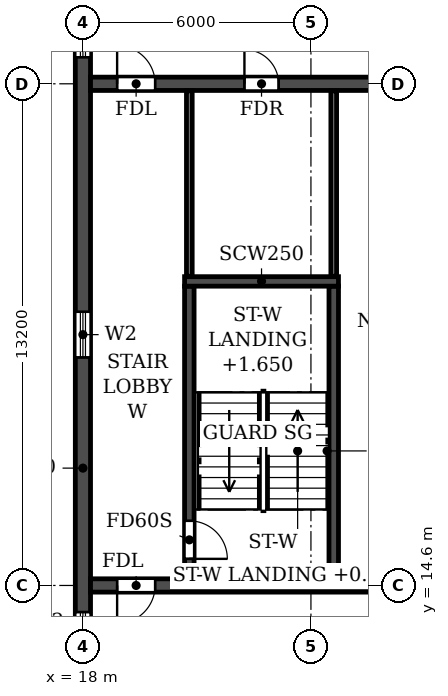
"""IFC4 building model, lengths in metres.
Left out: names, types, materials, properties, quantities, classifications, styles, units other than length and angle.
Written with IfcOpenShell. Run it as: python <this file> out.ifc"""

import sys

from ifc_helpers import new_model, si_unit, direction, frame, frame_2d, origin, place, context, subcontext, project, spatial, rectangle, extrude, element, fill, save


model = new_model("IFC4")
c1 = context("Model", 3, precision=1e-05, world=origin(), true_north=direction((0.0, 1.0)))
c2 = subcontext(c1, "Body", "Model", "MODEL_VIEW")
j1 = project(units=[si_unit("LENGTHUNIT", "METRE"), si_unit("PLANEANGLEUNIT", "RADIAN")], contexts=[c1])
p1 = place(None, origin())
s1 = spatial("IfcSite", under=j1, at=p1, CompositionType="ELEMENT")
p2 = place(p1, origin())
s2 = spatial("IfcBuilding", under=s1, at=p2, CompositionType="ELEMENT")
p3 = place(p2, frame((0.0, 0.0, 257.7)))
s3 = spatial("IfcBuildingStorey", under=s2, at=p3, CompositionType="ELEMENT", Elevation=257.7)
p4 = place(p3, frame((18.0, 4.683, 0.0), z_axis=(0.0, 0.0, 1.0), x_axis=(0.0, 1.0, 0.0)))
e1 = element("IfcWall", 1, at=p4, inside=s3, PredefinedType="SHEAR", context=c2, shape_type="SweptSolid", body=[
    extrude(rectangle(XDim=31.834, YDim=0.4, at=frame_2d((15.917, 0.0))), origin(), (0.0, 0.0, 1.0), 3.0),
])
p5 = place(p4, frame((23.817, 0.0, 0.9)))
e2 = element("IfcOpeningElement", 2, at=p5, cuts=e1, PredefinedType="OPENING", context=c2, shape_type="SweptSolid", body=[
    extrude(rectangle(XDim=1.2, YDim=1.5, at=frame_2d((0.6, 0.75))), frame((0.0, 0.21, 0.0), z_axis=(0.0, -1.0, 0.0), x_axis=(1.0, 0.0, 0.0)), (0.0, 0.0, 1.0), 0.42),
])
p6 = place(p4, frame((8.017, 0.0, 0.9)))
e3 = element("IfcOpeningElement", 3, at=p6, cuts=e1, PredefinedType="OPENING", context=c2, shape_type="SweptSolid", body=[
    extrude(rectangle(XDim=1.2, YDim=1.5, at=frame_2d((0.6, 0.75))), frame((0.0, 0.21, 0.0), z_axis=(0.0, -1.0, 0.0), x_axis=(1.0, 0.0, 0.0)), (0.0, 0.0, 1.0), 0.42),
])
p7 = place(p4, frame((27.694, 0.0, 0.6)))
e4 = element("IfcOpeningElement", 4, at=p7, cuts=e1, PredefinedType="OPENING", context=c2, shape_type="SweptSolid", body=[
    extrude(rectangle(XDim=2.2, YDim=1.8, at=frame_2d((1.1, 0.9))), frame((0.0, 0.21, 0.0), z_axis=(0.0, -1.0, 0.0), x_axis=(1.0, 0.0, 0.0)), (0.0, 0.0, 1.0), 0.42),
])
p8 = place(p4, frame((2.541, 0.0, 0.6)))
e5 = element("IfcOpeningElement", 5, at=p8, cuts=e1, PredefinedType="OPENING", context=c2, shape_type="SweptSolid", body=[
    extrude(rectangle(XDim=2.2, YDim=1.8, at=frame_2d((1.1, 0.9))), frame((0.0, 0.21, 0.0), z_axis=(0.0, -1.0, 0.0), x_axis=(1.0, 0.0, 0.0)), (0.0, 0.0, 1.0), 0.42),
])
p9 = place(p4, frame((15.917, 0.0, 0.9)))
e6 = element("IfcOpeningElement", 6, at=p9, cuts=e1, PredefinedType="OPENING", context=c2, shape_type="SweptSolid", body=[
    extrude(rectangle(XDim=1.2, YDim=1.5, at=frame_2d((0.6, 0.75))), frame((0.0, 0.21, 0.0), z_axis=(0.0, -1.0, 0.0), x_axis=(1.0, 0.0, 0.0)), (0.0, 0.0, 1.0), 0.42),
])
p10 = place(p3, frame((18.2, 14.6, 0.0), z_axis=(0.0, 0.0, 1.0), x_axis=(1.0, 0.0, 0.0)))
e7 = element("IfcWall", 7, at=p10, inside=s3, PredefinedType="SOLIDWALL", context=c2, shape_type="SweptSolid", body=[
    extrude(rectangle(XDim=65.6, YDim=0.35, at=frame_2d((32.8, 0.0))), origin(), (0.0, 0.0, 1.0), 3.0),
])
p11 = place(p10, frame((0.7, 0.0, 0.0)))
e8 = element("IfcOpeningElement", 8, at=p11, cuts=e7, PredefinedType="OPENING", context=c2, shape_type="SweptSolid", body=[
    extrude(rectangle(XDim=1.0, YDim=2.1, at=frame_2d((0.5, 1.05))), frame((0.0, 0.185, 0.0), z_axis=(0.0, -1.0, 0.0), x_axis=(1.0, 0.0, 0.0)), (0.0, 0.0, 1.0), 0.37),
])
p12 = place(p10, frame((8.6, 0.0, 0.0)))
e9 = element("IfcOpeningElement", 9, at=p12, cuts=e7, PredefinedType="OPENING", context=c2, shape_type="SweptSolid", body=[
    extrude(rectangle(XDim=1.0, YDim=2.1, at=frame_2d((0.5, 1.05))), frame((0.0, 0.185, 0.0), z_axis=(0.0, -1.0, 0.0), x_axis=(1.0, 0.0, 0.0)), (0.0, 0.0, 1.0), 0.37),
])
p13 = place(p10, frame((13.2, 0.0, 0.0)))
e10 = element("IfcOpeningElement", 10, at=p13, cuts=e7, PredefinedType="OPENING", context=c2, shape_type="SweptSolid", body=[
    extrude(rectangle(XDim=1.0, YDim=2.1, at=frame_2d((0.5, 1.05))), frame((0.0, 0.185, 0.0), z_axis=(0.0, -1.0, 0.0), x_axis=(1.0, 0.0, 0.0)), (0.0, 0.0, 1.0), 0.37),
])
p14 = place(p10, frame((24.5, 0.0, 0.0)))
e11 = element("IfcOpeningElement", 11, at=p14, cuts=e7, PredefinedType="OPENING", context=c2, shape_type="SweptSolid", body=[
    extrude(rectangle(XDim=1.0, YDim=2.1, at=frame_2d((0.5, 1.05))), frame((0.0, 0.185, 0.0), z_axis=(0.0, -1.0, 0.0), x_axis=(1.0, 0.0, 0.0)), (0.0, 0.0, 1.0), 0.37),
])
p15 = place(p10, frame((28.4, 0.0, 0.0)))
e12 = element("IfcOpeningElement", 12, at=p15, cuts=e7, PredefinedType="OPENING", context=c2, shape_type="SweptSolid", body=[
    extrude(rectangle(XDim=1.0, YDim=2.1, at=frame_2d((0.5, 1.05))), frame((0.0, 0.185, 0.0), z_axis=(0.0, -1.0, 0.0), x_axis=(1.0, 0.0, 0.0)), (0.0, 0.0, 1.0), 0.37),
])
p16 = place(p10, frame((32.3, 0.0, 0.0)))
e13 = element("IfcOpeningElement", 13, at=p16, cuts=e7, PredefinedType="OPENING", context=c2, shape_type="SweptSolid", body=[
    extrude(rectangle(XDim=1.0, YDim=2.1, at=frame_2d((0.5, 1.05))), frame((0.0, 0.185, 0.0), z_axis=(0.0, -1.0, 0.0), x_axis=(1.0, 0.0, 0.0)), (0.0, 0.0, 1.0), 0.37),
])
p17 = place(p10, frame((34.9, 0.0, 0.0)))
e14 = element("IfcOpeningElement", 14, at=p17, cuts=e7, PredefinedType="OPENING", context=c2, shape_type="SweptSolid", body=[
    extrude(rectangle(XDim=1.0, YDim=2.1, at=frame_2d((0.5, 1.05))), frame((0.0, 0.185, 0.0), z_axis=(0.0, -1.0, 0.0), x_axis=(1.0, 0.0, 0.0)), (0.0, 0.0, 1.0), 0.37),
])
p18 = place(p10, frame((38.8, 0.0, 0.0)))
e15 = element("IfcOpeningElement", 15, at=p18, cuts=e7, PredefinedType="OPENING", context=c2, shape_type="SweptSolid", body=[
    extrude(rectangle(XDim=1.0, YDim=2.1, at=frame_2d((0.5, 1.05))), frame((0.0, 0.185, 0.0), z_axis=(0.0, -1.0, 0.0), x_axis=(1.0, 0.0, 0.0)), (0.0, 0.0, 1.0), 0.37),
])
p19 = place(p10, frame((51.4, 0.0, 0.0)))
e16 = element("IfcOpeningElement", 16, at=p19, cuts=e7, PredefinedType="OPENING", context=c2, shape_type="SweptSolid", body=[
    extrude(rectangle(XDim=1.0, YDim=2.1, at=frame_2d((0.5, 1.05))), frame((0.0, 0.185, 0.0), z_axis=(0.0, -1.0, 0.0), x_axis=(1.0, 0.0, 0.0)), (0.0, 0.0, 1.0), 0.37),
])
p20 = place(p10, frame((56.0, 0.0, 0.0)))
e17 = element("IfcOpeningElement", 17, at=p20, cuts=e7, PredefinedType="OPENING", context=c2, shape_type="SweptSolid", body=[
    extrude(rectangle(XDim=1.0, YDim=2.1, at=frame_2d((0.5, 1.05))), frame((0.0, 0.185, 0.0), z_axis=(0.0, -1.0, 0.0), x_axis=(1.0, 0.0, 0.0)), (0.0, 0.0, 1.0), 0.37),
])
p21 = place(p10, frame((63.9, 0.0, 0.0)))
e18 = element("IfcOpeningElement", 18, at=p21, cuts=e7, PredefinedType="OPENING", context=c2, shape_type="SweptSolid", body=[
    extrude(rectangle(XDim=1.0, YDim=2.1, at=frame_2d((0.5, 1.05))), frame((0.0, 0.185, 0.0), z_axis=(0.0, -1.0, 0.0), x_axis=(1.0, 0.0, 0.0)), (0.0, 0.0, 1.0), 0.37),
])
p22 = place(p3, frame((18.2, 27.8, 0.0), z_axis=(0.0, 0.0, 1.0), x_axis=(1.0, 0.0, 0.0)))
e19 = element("IfcWall", 19, at=p22, inside=s3, PredefinedType="SOLIDWALL", context=c2, shape_type="SweptSolid", body=[
    extrude(rectangle(XDim=65.6, YDim=0.35, at=frame_2d((32.8, 0.0))), origin(), (0.0, 0.0, 1.0), 3.0),
])
p23 = place(p22, frame((0.7, 0.0, 0.0)))
e20 = element("IfcOpeningElement", 20, at=p23, cuts=e19, PredefinedType="OPENING", context=c2, shape_type="SweptSolid", body=[
    extrude(rectangle(XDim=1.0, YDim=2.1, at=frame_2d((0.5, 1.05))), frame((0.0, 0.185, 0.0), z_axis=(0.0, -1.0, 0.0), x_axis=(1.0, 0.0, 0.0)), (0.0, 0.0, 1.0), 0.37),
])
p24 = place(p22, frame((4.05, 0.0, 0.0)))
e21 = element("IfcOpeningElement", 21, at=p24, cuts=e19, PredefinedType="OPENING", context=c2, shape_type="SweptSolid", body=[
    extrude(rectangle(XDim=0.9, YDim=2.1, at=frame_2d((0.45, 1.05))), frame((0.0, 0.185, 0.0), z_axis=(0.0, -1.0, 0.0), x_axis=(1.0, 0.0, 0.0)), (0.0, 0.0, 1.0), 0.37),
])
p25 = place(p22, frame((13.25, 0.0, 0.0)))
e22 = element("IfcOpeningElement", 22, at=p25, cuts=e19, PredefinedType="OPENING", context=c2, shape_type="SweptSolid", body=[
    extrude(rectangle(XDim=0.9, YDim=2.1, at=frame_2d((0.45, 1.05))), frame((0.0, 0.185, 0.0), z_axis=(0.0, -1.0, 0.0), x_axis=(1.0, 0.0, 0.0)), (0.0, 0.0, 1.0), 0.37),
])
p26 = place(p22, frame((19.0, 0.0, 0.0)))
e23 = element("IfcOpeningElement", 23, at=p26, cuts=e19, PredefinedType="OPENING", context=c2, shape_type="SweptSolid", body=[
    extrude(rectangle(XDim=1.0, YDim=2.1, at=frame_2d((0.5, 1.05))), frame((0.0, 0.185, 0.0), z_axis=(0.0, -1.0, 0.0), x_axis=(1.0, 0.0, 0.0)), (0.0, 0.0, 1.0), 0.37),
])
p27 = place(p22, frame((24.2, 0.0, 0.0)))
e24 = element("IfcOpeningElement", 24, at=p27, cuts=e19, PredefinedType="OPENING", context=c2, shape_type="SweptSolid", body=[
    extrude(rectangle(XDim=1.0, YDim=2.1, at=frame_2d((0.5, 1.05))), frame((0.0, 0.185, 0.0), z_axis=(0.0, -1.0, 0.0), x_axis=(1.0, 0.0, 0.0)), (0.0, 0.0, 1.0), 0.37),
])
p28 = place(p22, frame((29.4, 0.0, 0.0)))
e25 = element("IfcOpeningElement", 25, at=p28, cuts=e19, PredefinedType="OPENING", context=c2, shape_type="SweptSolid", body=[
    extrude(rectangle(XDim=1.0, YDim=2.1, at=frame_2d((0.5, 1.05))), frame((0.0, 0.185, 0.0), z_axis=(0.0, -1.0, 0.0), x_axis=(1.0, 0.0, 0.0)), (0.0, 0.0, 1.0), 0.37),
])
p29 = place(p22, frame((32.3, 0.0, 0.0)))
e26 = element("IfcOpeningElement", 26, at=p29, cuts=e19, PredefinedType="OPENING", context=c2, shape_type="SweptSolid", body=[
    extrude(rectangle(XDim=1.0, YDim=2.1, at=frame_2d((0.5, 1.05))), frame((0.0, 0.185, 0.0), z_axis=(0.0, -1.0, 0.0), x_axis=(1.0, 0.0, 0.0)), (0.0, 0.0, 1.0), 0.37),
])
p30 = place(p22, frame((36.5, 0.0, 0.0)))
e27 = element("IfcOpeningElement", 27, at=p30, cuts=e19, PredefinedType="OPENING", context=c2, shape_type="SweptSolid", body=[
    extrude(rectangle(XDim=1.0, YDim=2.1, at=frame_2d((0.5, 1.05))), frame((0.0, 0.185, 0.0), z_axis=(0.0, -1.0, 0.0), x_axis=(1.0, 0.0, 0.0)), (0.0, 0.0, 1.0), 0.37),
])
p31 = place(p22, frame((40.4, 0.0, 0.0)))
e28 = element("IfcOpeningElement", 28, at=p31, cuts=e19, PredefinedType="OPENING", context=c2, shape_type="SweptSolid", body=[
    extrude(rectangle(XDim=1.0, YDim=2.1, at=frame_2d((0.5, 1.05))), frame((0.0, 0.185, 0.0), z_axis=(0.0, -1.0, 0.0), x_axis=(1.0, 0.0, 0.0)), (0.0, 0.0, 1.0), 0.37),
])
p32 = place(p22, frame((43.0, 0.0, 0.0)))
e29 = element("IfcOpeningElement", 29, at=p32, cuts=e19, PredefinedType="OPENING", context=c2, shape_type="SweptSolid", body=[
    extrude(rectangle(XDim=1.0, YDim=2.1, at=frame_2d((0.5, 1.05))), frame((0.0, 0.185, 0.0), z_axis=(0.0, -1.0, 0.0), x_axis=(1.0, 0.0, 0.0)), (0.0, 0.0, 1.0), 0.37),
])
p33 = place(p22, frame((46.65, 0.0, 0.0)))
e30 = element("IfcOpeningElement", 30, at=p33, cuts=e19, PredefinedType="OPENING", context=c2, shape_type="SweptSolid", body=[
    extrude(rectangle(XDim=1.5, YDim=2.1, at=frame_2d((0.75, 1.05))), frame((0.0, 0.185, 0.0), z_axis=(0.0, -1.0, 0.0), x_axis=(1.0, 0.0, 0.0)), (0.0, 0.0, 1.0), 0.37),
])
p34 = place(p22, frame((51.45, 0.0, 0.0)))
e31 = element("IfcOpeningElement", 31, at=p34, cuts=e19, PredefinedType="OPENING", context=c2, shape_type="SweptSolid", body=[
    extrude(rectangle(XDim=0.9, YDim=2.1, at=frame_2d((0.45, 1.05))), frame((0.0, 0.185, 0.0), z_axis=(0.0, -1.0, 0.0), x_axis=(1.0, 0.0, 0.0)), (0.0, 0.0, 1.0), 0.37),
])
p35 = place(p22, frame((60.65, 0.0, 0.0)))
e32 = element("IfcOpeningElement", 32, at=p35, cuts=e19, PredefinedType="OPENING", context=c2, shape_type="SweptSolid", body=[
    extrude(rectangle(XDim=0.9, YDim=2.1, at=frame_2d((0.45, 1.05))), frame((0.0, 0.185, 0.0), z_axis=(0.0, -1.0, 0.0), x_axis=(1.0, 0.0, 0.0)), (0.0, 0.0, 1.0), 0.37),
])
p36 = place(p22, frame((63.9, 0.0, 0.0)))
e33 = element("IfcOpeningElement", 33, at=p36, cuts=e19, PredefinedType="OPENING", context=c2, shape_type="SweptSolid", body=[
    extrude(rectangle(XDim=1.0, YDim=2.1, at=frame_2d((0.5, 1.05))), frame((0.0, 0.185, 0.0), z_axis=(0.0, -1.0, 0.0), x_axis=(1.0, 0.0, 0.0)), (0.0, 0.0, 1.0), 0.37),
])
p37 = place(p3, frame((20.8, 14.775, 0.0), z_axis=(0.0, 0.0, 1.0), x_axis=(0.0, 1.0, 0.0)))
e34 = element("IfcWall", 34, at=p37, inside=s3, PredefinedType="SOLIDWALL", context=c2, shape_type="SweptSolid", body=[
    extrude(rectangle(XDim=7.7, YDim=0.25, at=frame_2d((3.85, 0.0))), origin(), (0.0, 0.0, 1.0), 3.0),
])
p38 = place(p37, frame((0.525, 0.0, 0.0)))
e35 = element("IfcOpeningElement", 35, at=p38, cuts=e34, PredefinedType="OPENING", context=c2, shape_type="SweptSolid", body=[
    extrude(rectangle(XDim=1.0, YDim=2.1, at=frame_2d((0.5, 1.05))), frame((0.0, 0.135, 0.0), z_axis=(0.0, -1.0, 0.0), x_axis=(1.0, 0.0, 0.0)), (0.0, 0.0, 1.0), 0.27),
])
p39 = place(p3, frame((24.6, 14.775, 0.0), z_axis=(0.0, 0.0, 1.0), x_axis=(0.0, 1.0, 0.0)))
e36 = element("IfcWall", 36, at=p39, inside=s3, PredefinedType="SOLIDWALL", context=c2, shape_type="SweptSolid", body=[
    extrude(rectangle(XDim=7.7, YDim=0.25, at=frame_2d((3.85, 0.0))), origin(), (0.0, 0.0, 1.0), 3.0),
])
p40 = place(p3, frame((20.675, 22.6, 0.0), z_axis=(0.0, 0.0, 1.0), x_axis=(1.0, 0.0, 0.0)))
e37 = element("IfcWall", 37, at=p40, inside=s3, PredefinedType="SOLIDWALL", context=c2, shape_type="SweptSolid", body=[
    extrude(rectangle(XDim=4.05, YDim=0.25, at=frame_2d((2.025, 0.0))), origin(), (0.0, 0.0, 1.0), 3.0),
])
for number, where, z_axis, x_axis in (
    (38, (20.8, 22.735, 0.0), (0.0, 0.0, 1.0), (0.0, 1.0, 0.0)),
    (39, (24.6, 22.735, 0.0), (0.0, 0.0, 1.0), (0.0, 1.0, 0.0)),
):
    element("IfcWall", number, at=place(p3, frame(where, z_axis=z_axis, x_axis=x_axis)), inside=s3, PredefinedType="PARTITIONING", context=c2, shape_type="SweptSolid", body=[
        extrude(rectangle(XDim=4.88, YDim=0.15, at=frame_2d((2.44, 0.0))), origin(), (0.0, 0.0, 1.0), 3.0),
    ])
p41 = place(p5, origin())
e40 = element("IfcWindow", 40, at=p41, inside=s3, PartitioningType="SINGLE_PANEL", PredefinedType="WINDOW", context=c2, shape_type="SweptSolid", body=[
    extrude(rectangle(XDim=1.2, YDim=1.5, at=frame_2d((0.6, 0.75))), frame((0.0, 0.03, 0.0), z_axis=(0.0, -1.0, 0.0), x_axis=(1.0, 0.0, 0.0)), (0.0, 0.0, 1.0), 0.06),
])
fill(e2, e40)
p42 = place(p6, origin())
e41 = element("IfcWindow", 41, at=p42, inside=s3, PartitioningType="SINGLE_PANEL", PredefinedType="WINDOW", context=c2, shape_type="SweptSolid", body=[
    extrude(rectangle(XDim=1.2, YDim=1.5, at=frame_2d((0.6, 0.75))), frame((0.0, 0.03, 0.0), z_axis=(0.0, -1.0, 0.0), x_axis=(1.0, 0.0, 0.0)), (0.0, 0.0, 1.0), 0.06),
])
fill(e3, e41)
p43 = place(p9, origin())
e42 = element("IfcWindow", 42, at=p43, inside=s3, PartitioningType="SINGLE_PANEL", PredefinedType="WINDOW", context=c2, shape_type="SweptSolid", body=[
    extrude(rectangle(XDim=1.2, YDim=1.5, at=frame_2d((0.6, 0.75))), frame((0.0, 0.03, 0.0), z_axis=(0.0, -1.0, 0.0), x_axis=(1.0, 0.0, 0.0)), (0.0, 0.0, 1.0), 0.06),
])
fill(e6, e42)
p44 = place(p23, origin())
e43 = element("IfcDoor", 43, at=p44, inside=s3, OperationType="SINGLE_SWING_LEFT", PredefinedType="DOOR", context=c2, shape_type="SweptSolid", body=[
    extrude(rectangle(XDim=1.0, YDim=2.1, at=frame_2d((0.5, 1.05))), frame((0.0, 0.025, 0.0), z_axis=(0.0, -1.0, 0.0), x_axis=(1.0, 0.0, 0.0)), (0.0, 0.0, 1.0), 0.05),
])
fill(e20, e43)
p45 = place(p24, origin())
e44 = element("IfcDoor", 44, at=p45, inside=s3, OperationType="SINGLE_SWING_LEFT", PredefinedType="DOOR", context=c2, shape_type="SweptSolid", body=[
    extrude(rectangle(XDim=0.9, YDim=2.1, at=frame_2d((0.45, 1.05))), frame((0.0, 0.025, 0.0), z_axis=(0.0, -1.0, 0.0), x_axis=(1.0, 0.0, 0.0)), (0.0, 0.0, 1.0), 0.05),
])
fill(e21, e44)
p46 = place(p11, frame((1.0, 0.0, 0.0), z_axis=(0.0, 0.0, 1.0), x_axis=(-1.0, 0.0, 0.0)))
e45 = element("IfcDoor", 45, at=p46, inside=s3, OperationType="SINGLE_SWING_RIGHT", PredefinedType="DOOR", context=c2, shape_type="SweptSolid", body=[
    extrude(rectangle(XDim=1.0, YDim=2.1, at=frame_2d((0.5, 1.05))), frame((0.0, 0.025, 0.0), z_axis=(0.0, -1.0, 0.0), x_axis=(1.0, 0.0, 0.0)), (0.0, 0.0, 1.0), 0.05),
])
fill(e8, e45)
p47 = place(p38, frame((1.0, 0.0, 0.0), z_axis=(0.0, 0.0, 1.0), x_axis=(-1.0, 0.0, 0.0)))
e46 = element("IfcDoor", 46, at=p47, inside=s3, OperationType="SINGLE_SWING_RIGHT", PredefinedType="DOOR", context=c2, shape_type="SweptSolid", body=[
    extrude(rectangle(XDim=1.0, YDim=2.1, at=frame_2d((0.5, 1.05))), frame((0.0, 0.025, 0.0), z_axis=(0.0, -1.0, 0.0), x_axis=(1.0, 0.0, 0.0)), (0.0, 0.0, 1.0), 0.05),
])
fill(e35, e46)
save(model, sys.argv[1])
